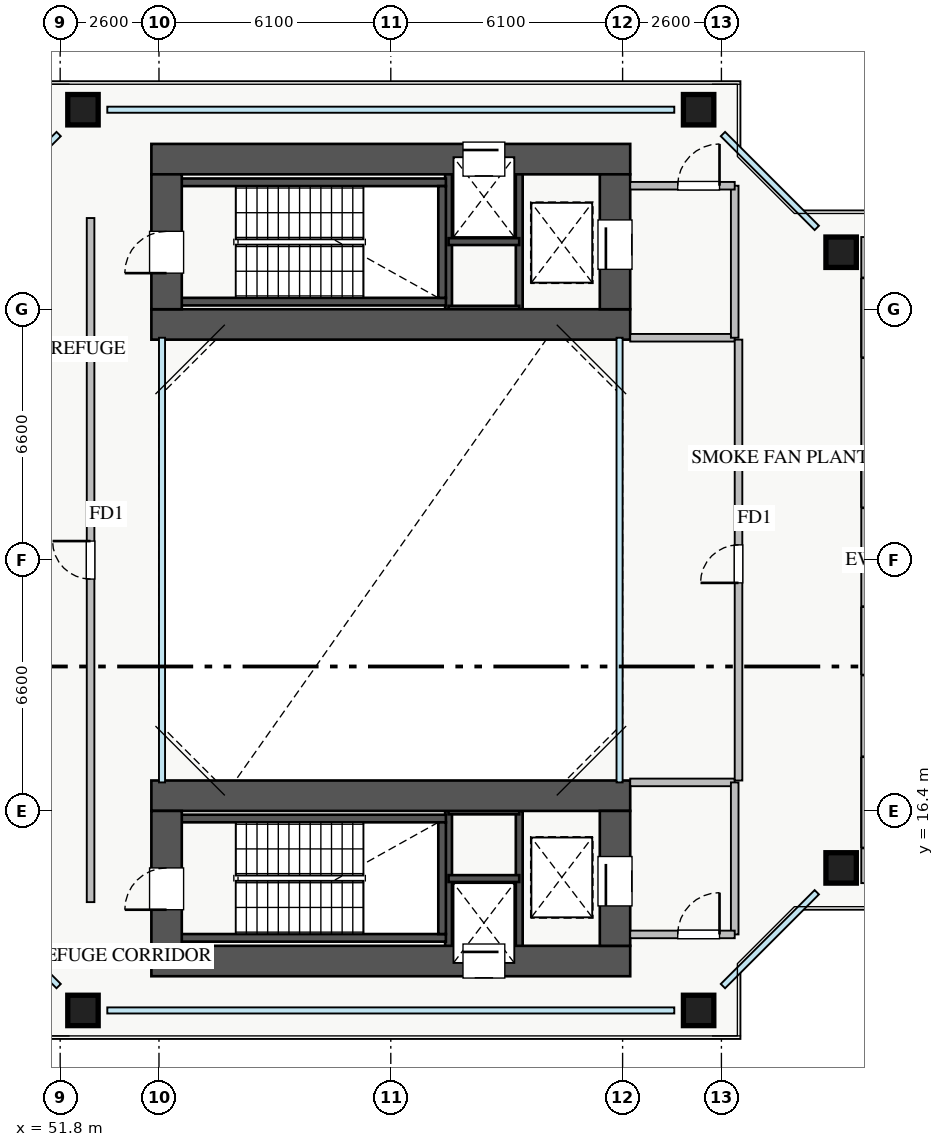
"""IFC4 building model, lengths in metres.
Left out: names, types, materials, properties, quantities, classifications, styles, units other than length and angle.
Written with IfcOpenShell. Run it as: python <this file> out.ifc"""

import sys

from ifc_helpers import new_model, si_unit, direction, frame, frame_2d, origin, origin_2d, place, context, subcontext, project, spatial, rectangle, extrude, source, transform, mapped, element, fill, save


model = new_model("IFC4")
c1 = context("Model", 3, precision=1e-05, world=origin(), true_north=direction((0.0, 1.0)))
c2 = subcontext(c1, "Body", "Model", "MODEL_VIEW")
j1 = project(units=[si_unit("LENGTHUNIT", "METRE"), si_unit("PLANEANGLEUNIT", "RADIAN")], contexts=[c1])
p1 = place(None, origin())
s1 = spatial("IfcSite", under=j1, at=p1, CompositionType="ELEMENT")
p2 = place(p1, origin())
s2 = spatial("IfcBuilding", under=s1, at=p2, CompositionType="ELEMENT")
p3 = place(p2, frame((0.0, 0.0, 92.5)))
s3 = spatial("IfcBuildingStorey", under=s2, at=p3, CompositionType="ELEMENT", Elevation=92.5)
for number, where, z_axis, x_axis in (
    (1, (62.02, 29.6, 0.0), (0.0, 0.0, 1.0), (0.0, 1.0, 0.0)),
    (2, (63.88, 29.6, 0.0), (0.0, 0.0, 1.0), (0.0, 1.0, 0.0)),
):
    element("IfcWall", number, at=place(p3, frame(where, z_axis=z_axis, x_axis=x_axis)), inside=s3, PredefinedType="SHEAR", context=c2, shape_type="SweptSolid", body=[
        extrude(rectangle(XDim=3.95, YDim=0.18, at=frame_2d((1.975, 0.0))), origin(), (0.0, 0.0, 1.0), 4.32),
    ])
for number, where, z_axis, x_axis in (
    (3, (62.02, 31.38, 0.0), (0.0, 0.0, 1.0), (1.0, 0.0, 0.0)),
    (4, (62.02, 29.6, 0.0), (0.0, 0.0, 1.0), (1.0, 0.0, 0.0)),
):
    element("IfcWall", number, at=place(p3, frame(where, z_axis=z_axis, x_axis=x_axis)), inside=s3, PredefinedType="SHEAR", context=c2, shape_type="SweptSolid", body=[
        extrude(rectangle(XDim=1.86, YDim=0.18, at=frame_2d((0.93, 0.0))), origin(), (0.0, 0.0, 1.0), 4.32),
    ])
for number, where, z_axis, x_axis in (
    (5, (62.02, 12.45, 0.0), (0.0, 0.0, 1.0), (0.0, 1.0, 0.0)),
    (6, (63.88, 12.45, 0.0), (0.0, 0.0, 1.0), (0.0, 1.0, 0.0)),
):
    element("IfcWall", number, at=place(p3, frame(where, z_axis=z_axis, x_axis=x_axis)), inside=s3, PredefinedType="SHEAR", context=c2, shape_type="SweptSolid", body=[
        extrude(rectangle(XDim=3.95, YDim=0.18, at=frame_2d((1.975, 0.0))), origin(), (0.0, 0.0, 1.0), 4.32),
    ])
for number, where, z_axis, x_axis in (
    (7, (62.02, 14.62, 0.0), (0.0, 0.0, 1.0), (1.0, 0.0, 0.0)),
    (8, (62.02, 16.4, 0.0), (0.0, 0.0, 1.0), (1.0, 0.0, 0.0)),
):
    element("IfcWall", number, at=place(p3, frame(where, z_axis=z_axis, x_axis=x_axis)), inside=s3, PredefinedType="SHEAR", context=c2, shape_type="SweptSolid", body=[
        extrude(rectangle(XDim=1.86, YDim=0.18, at=frame_2d((0.93, 0.0))), origin(), (0.0, 0.0, 1.0), 4.32),
    ])
for number, where, z_axis, x_axis in (
    (9, (54.8, 29.8, 0.0), (0.0, 0.0, 1.0), (1.0, 0.0, 0.0)),
    (10, (54.8, 32.94, 0.0), (0.0, 0.0, 1.0), (1.0, 0.0, 0.0)),
):
    element("IfcWall", number, at=place(p3, frame(where, z_axis=z_axis, x_axis=x_axis)), inside=s3, PredefinedType="SHEAR", context=c2, shape_type="SweptSolid", body=[
        extrude(rectangle(XDim=7.15, YDim=0.2, at=frame_2d((3.575, 0.0))), origin(), (0.0, 0.0, 1.0), 4.5),
    ])
p4 = place(p3, frame((61.85, 29.9, 0.0), z_axis=(0.0, 0.0, 1.0), x_axis=(0.0, 1.0, 0.0)))
e11 = element("IfcWall", 11, at=p4, inside=s3, PredefinedType="SHEAR", context=c2, shape_type="SweptSolid", body=[
    extrude(rectangle(XDim=2.94, YDim=0.2, at=frame_2d((1.47, 0.0))), origin(), (0.0, 0.0, 1.0), 4.5),
])
for number, where, z_axis, x_axis in (
    (12, (54.8, 13.06, 0.0), (0.0, 0.0, 1.0), (1.0, 0.0, 0.0)),
    (13, (54.8, 16.2, 0.0), (0.0, 0.0, 1.0), (1.0, 0.0, 0.0)),
):
    element("IfcWall", number, at=place(p3, frame(where, z_axis=z_axis, x_axis=x_axis)), inside=s3, PredefinedType="SHEAR", context=c2, shape_type="SweptSolid", body=[
        extrude(rectangle(XDim=7.15, YDim=0.2, at=frame_2d((3.575, 0.0))), origin(), (0.0, 0.0, 1.0), 4.5),
    ])
p5 = place(p3, frame((61.85, 13.16, 0.0), z_axis=(0.0, 0.0, 1.0), x_axis=(0.0, 1.0, 0.0)))
e14 = element("IfcWall", 14, at=p5, inside=s3, PredefinedType="SHEAR", context=c2, shape_type="SweptSolid", body=[
    extrude(rectangle(XDim=2.94, YDim=0.2, at=frame_2d((1.47, 0.0))), origin(), (0.0, 0.0, 1.0), 4.5),
])
p6 = place(p3, frame((54.2, 29.2, 0.0), z_axis=(0.0, 0.0, 1.0), x_axis=(1.0, 0.0, 0.0)))
e15 = element("IfcWall", 15, at=p6, inside=s3, PredefinedType="SHEAR", context=c2, shape_type="SweptSolid", body=[
    extrude(rectangle(XDim=12.6, YDim=0.8, at=frame_2d((6.3, 0.0))), origin(), (0.0, 0.0, 1.0), 4.5),
])
p7 = place(p3, frame((54.2, 33.55, 0.0), z_axis=(0.0, 0.0, 1.0), x_axis=(1.0, 0.0, 0.0)))
e16 = element("IfcWall", 16, at=p7, inside=s3, PredefinedType="SHEAR", context=c2, shape_type="SweptSolid", body=[
    extrude(rectangle(XDim=12.6, YDim=0.8, at=frame_2d((6.3, 0.0))), origin(), (0.0, 0.0, 1.0), 4.5),
])
p8 = place(p7, frame((8.2, 0.0, 0.0)))
e17 = element("IfcOpeningElement", 17, at=p8, cuts=e16, PredefinedType="OPENING", context=c2, shape_type="SweptSolid", body=[
    extrude(rectangle(XDim=1.1, YDim=2.05, at=frame_2d((0.55, 1.025))), frame((0.0, 0.41, 0.0), z_axis=(0.0, -1.0, 0.0), x_axis=(1.0, 0.0, 0.0)), (0.0, 0.0, 1.0), 0.82),
])
p9 = place(p3, frame((54.6, 29.6, 0.0), z_axis=(0.0, 0.0, 1.0), x_axis=(0.0, 1.0, 0.0)))
e18 = element("IfcWall", 18, at=p9, inside=s3, PredefinedType="SHEAR", context=c2, shape_type="SweptSolid", body=[
    extrude(rectangle(XDim=3.55, YDim=0.8, at=frame_2d((1.775, 0.0))), origin(), (0.0, 0.0, 1.0), 4.5),
])
p10 = place(p9, frame((0.95, 0.0, 0.0)))
e19 = element("IfcOpeningElement", 19, at=p10, cuts=e18, PredefinedType="OPENING", context=c2, shape_type="SweptSolid", body=[
    extrude(rectangle(XDim=1.1, YDim=2.05, at=frame_2d((0.55, 1.025))), frame((0.0, 0.41, 0.0), z_axis=(0.0, -1.0, 0.0), x_axis=(1.0, 0.0, 0.0)), (0.0, 0.0, 1.0), 0.82),
])
p11 = place(p3, frame((66.4, 29.6, 0.0), z_axis=(0.0, 0.0, 1.0), x_axis=(0.0, 1.0, 0.0)))
e20 = element("IfcWall", 20, at=p11, inside=s3, PredefinedType="SHEAR", context=c2, shape_type="SweptSolid", body=[
    extrude(rectangle(XDim=3.55, YDim=0.8, at=frame_2d((1.775, 0.0))), origin(), (0.0, 0.0, 1.0), 4.5),
])
p12 = place(p11, frame((1.05, 0.0, 0.0)))
e21 = element("IfcOpeningElement", 21, at=p12, cuts=e20, PredefinedType="OPENING", context=c2, shape_type="SweptSolid", body=[
    extrude(rectangle(XDim=1.3, YDim=2.05, at=frame_2d((0.65, 1.025))), frame((0.0, 0.41, 0.0), z_axis=(0.0, -1.0, 0.0), x_axis=(1.0, 0.0, 0.0)), (0.0, 0.0, 1.0), 0.82),
])
p13 = place(p3, frame((54.2, 12.45, 0.0), z_axis=(0.0, 0.0, 1.0), x_axis=(1.0, 0.0, 0.0)))
e22 = element("IfcWall", 22, at=p13, inside=s3, PredefinedType="SHEAR", context=c2, shape_type="SweptSolid", body=[
    extrude(rectangle(XDim=12.6, YDim=0.8, at=frame_2d((6.3, 0.0))), origin(), (0.0, 0.0, 1.0), 4.5),
])
p14 = place(p13, frame((8.2, 0.0, 0.0)))
e23 = element("IfcOpeningElement", 23, at=p14, cuts=e22, PredefinedType="OPENING", context=c2, shape_type="SweptSolid", body=[
    extrude(rectangle(XDim=1.1, YDim=2.05, at=frame_2d((0.55, 1.025))), frame((0.0, 0.41, 0.0), z_axis=(0.0, -1.0, 0.0), x_axis=(1.0, 0.0, 0.0)), (0.0, 0.0, 1.0), 0.82),
])
p15 = place(p3, frame((54.2, 16.8, 0.0), z_axis=(0.0, 0.0, 1.0), x_axis=(1.0, 0.0, 0.0)))
e24 = element("IfcWall", 24, at=p15, inside=s3, PredefinedType="SHEAR", context=c2, shape_type="SweptSolid", body=[
    extrude(rectangle(XDim=12.6, YDim=0.8, at=frame_2d((6.3, 0.0))), origin(), (0.0, 0.0, 1.0), 4.5),
])
p16 = place(p3, frame((54.6, 12.85, 0.0), z_axis=(0.0, 0.0, 1.0), x_axis=(0.0, 1.0, 0.0)))
e25 = element("IfcWall", 25, at=p16, inside=s3, PredefinedType="SHEAR", context=c2, shape_type="SweptSolid", body=[
    extrude(rectangle(XDim=3.55, YDim=0.8, at=frame_2d((1.775, 0.0))), origin(), (0.0, 0.0, 1.0), 4.5),
])
p17 = place(p16, frame((0.95, 0.0, 0.0)))
e26 = element("IfcOpeningElement", 26, at=p17, cuts=e25, PredefinedType="OPENING", context=c2, shape_type="SweptSolid", body=[
    extrude(rectangle(XDim=1.1, YDim=2.05, at=frame_2d((0.55, 1.025))), frame((0.0, 0.41, 0.0), z_axis=(0.0, -1.0, 0.0), x_axis=(1.0, 0.0, 0.0)), (0.0, 0.0, 1.0), 0.82),
])
p18 = place(p3, frame((66.4, 12.85, 0.0), z_axis=(0.0, 0.0, 1.0), x_axis=(0.0, 1.0, 0.0)))
e27 = element("IfcWall", 27, at=p18, inside=s3, PredefinedType="SHEAR", context=c2, shape_type="SweptSolid", body=[
    extrude(rectangle(XDim=3.55, YDim=0.8, at=frame_2d((1.775, 0.0))), origin(), (0.0, 0.0, 1.0), 4.5),
])
p19 = place(p18, frame((1.05, 0.0, 0.0)))
e28 = element("IfcOpeningElement", 28, at=p19, cuts=e27, PredefinedType="OPENING", context=c2, shape_type="SweptSolid", body=[
    extrude(rectangle(XDim=1.3, YDim=2.05, at=frame_2d((0.65, 1.025))), frame((0.0, 0.41, 0.0), z_axis=(0.0, -1.0, 0.0), x_axis=(1.0, 0.0, 0.0)), (0.0, 0.0, 1.0), 0.82),
])
m1 = source(origin(), c2, "Body", "SweptSolid", [
    extrude(rectangle(XDim=0.8, YDim=0.8, at=origin_2d()), origin(), (0.0, 0.0, 1.0), 4.5),
])
for number, where, z_axis, x_axis in (
    (29, (52.4, 11.15, 0.0), (0.0, 0.0, 1.0), (1.0, 0.0, 0.0)),
    (30, (68.6, 11.15, 0.0), (0.0, 0.0, 1.0), (1.0, 0.0, 0.0)),
    (31, (72.35, 14.9, 0.0), (0.0, 0.0, 1.0), (1.0, 0.0, 0.0)),
    (32, (72.35, 31.1, 0.0), (0.0, 0.0, 1.0), (1.0, 0.0, 0.0)),
    (33, (68.6, 34.85, 0.0), (0.0, 0.0, 1.0), (1.0, 0.0, 0.0)),
    (34, (52.4, 34.85, 0.0), (0.0, 0.0, 1.0), (1.0, 0.0, 0.0)),
):
    element("IfcColumn", number, at=place(p3, frame(where, z_axis=z_axis, x_axis=x_axis)), inside=s3, PredefinedType="COLUMN", context=c2, shape_type="MappedRepresentation", body=[
        mapped(m1, transform((0.0, 0.0, 0.0), x_axis=(1.0, 0.0, 0.0), y_axis=(0.0, 1.0, 0.0), z_axis=(0.0, 0.0, 1.0), scale=1.0)),
    ])
p20 = place(p3, frame((72.99, 14.5, 0.0), z_axis=(0.0, 0.0, 1.0), x_axis=(0.0, 1.0, 0.0)))
e35 = element("IfcWall", 35, at=p20, inside=s3, PredefinedType="STANDARD", context=c2, shape_type="SweptSolid", body=[
    extrude(rectangle(XDim=17.0, YDim=0.22, at=frame_2d((8.5, 0.0))), origin(), (0.0, 0.0, 1.0), 3.86),
])
p21 = place(p20, frame((0.925, 0.0, 0.9)))
e36 = element("IfcOpeningElement", 36, at=p21, cuts=e35, PredefinedType="OPENING", context=c2, shape_type="SweptSolid", body=[
    extrude(rectangle(XDim=2.4, YDim=1.48, at=frame_2d((1.2, 0.74))), frame((0.0, 0.12, 0.0), z_axis=(0.0, -1.0, 0.0), x_axis=(1.0, 0.0, 0.0)), (0.0, 0.0, 1.0), 0.24),
])
p22 = place(p20, frame((5.475, 0.0, 0.9)))
e37 = element("IfcOpeningElement", 37, at=p22, cuts=e35, PredefinedType="OPENING", context=c2, shape_type="SweptSolid", body=[
    extrude(rectangle(XDim=1.8, YDim=1.45, at=frame_2d((0.9, 0.725))), frame((0.0, 0.12, 0.0), z_axis=(0.0, -1.0, 0.0), x_axis=(1.0, 0.0, 0.0)), (0.0, 0.0, 1.0), 0.24),
])
p23 = place(p20, frame((9.875, 0.0, 0.9)))
e38 = element("IfcOpeningElement", 38, at=p23, cuts=e35, PredefinedType="OPENING", context=c2, shape_type="SweptSolid", body=[
    extrude(rectangle(XDim=1.5, YDim=1.45, at=frame_2d((0.75, 0.725))), frame((0.0, 0.12, 0.0), z_axis=(0.0, -1.0, 0.0), x_axis=(1.0, 0.0, 0.0)), (0.0, 0.0, 1.0), 0.24),
])
p24 = place(p20, frame((13.825, 0.0, 0.9)))
e39 = element("IfcOpeningElement", 39, at=p24, cuts=e35, PredefinedType="OPENING", context=c2, shape_type="SweptSolid", body=[
    extrude(rectangle(XDim=2.1, YDim=1.48, at=frame_2d((1.05, 0.74))), frame((0.0, 0.12, 0.0), z_axis=(0.0, -1.0, 0.0), x_axis=(1.0, 0.0, 0.0)), (0.0, 0.0, 1.0), 0.24),
])
p25 = place(p3, frame((66.8, 28.85, 0.0), z_axis=(0.0, 0.0, 1.0), x_axis=(1.0, 0.0, 0.0)))
e40 = element("IfcWall", 40, at=p25, inside=s3, PredefinedType="PARTITIONING", context=c2, shape_type="SweptSolid", body=[
    extrude(rectangle(XDim=2.75, YDim=0.2, at=frame_2d((1.375, 0.0))), origin(), (0.0, 0.0, 1.0), 4.32),
])
p26 = place(p3, frame((69.55, 28.85, 0.0), z_axis=(0.0, 0.0, 1.0), x_axis=(0.0, 1.0, 0.0)))
e41 = element("IfcWall", 41, at=p26, inside=s3, PredefinedType="PARTITIONING", context=c2, shape_type="SweptSolid", body=[
    extrude(rectangle(XDim=4.0, YDim=0.2, at=frame_2d((2.0, 0.0))), origin(), (0.0, 0.0, 1.0), 4.32),
])
p27 = place(p3, frame((66.8, 32.85, 0.0), z_axis=(0.0, 0.0, 1.0), x_axis=(1.0, 0.0, 0.0)))
e42 = element("IfcWall", 42, at=p27, inside=s3, PredefinedType="PARTITIONING", context=c2, shape_type="SweptSolid", body=[
    extrude(rectangle(XDim=2.75, YDim=0.2, at=frame_2d((1.375, 0.0))), origin(), (0.0, 0.0, 1.0), 4.32),
])
p28 = place(p27, frame((1.25, 0.0, 0.0)))
e43 = element("IfcOpeningElement", 43, at=p28, cuts=e42, PredefinedType="OPENING", context=c2, shape_type="SweptSolid", body=[
    extrude(rectangle(XDim=1.1, YDim=2.05, at=frame_2d((0.55, 1.025))), frame((0.0, 0.11, 0.0), z_axis=(0.0, -1.0, 0.0), x_axis=(1.0, 0.0, 0.0)), (0.0, 0.0, 1.0), 0.22),
])
p29 = place(p3, frame((66.8, 17.15, 0.0), z_axis=(0.0, 0.0, 1.0), x_axis=(1.0, 0.0, 0.0)))
e44 = element("IfcWall", 44, at=p29, inside=s3, PredefinedType="PARTITIONING", context=c2, shape_type="SweptSolid", body=[
    extrude(rectangle(XDim=2.75, YDim=0.2, at=frame_2d((1.375, 0.0))), origin(), (0.0, 0.0, 1.0), 4.32),
])
p30 = place(p3, frame((69.55, 13.15, 0.0), z_axis=(0.0, 0.0, 1.0), x_axis=(0.0, 1.0, 0.0)))
e45 = element("IfcWall", 45, at=p30, inside=s3, PredefinedType="PARTITIONING", context=c2, shape_type="SweptSolid", body=[
    extrude(rectangle(XDim=4.0, YDim=0.2, at=frame_2d((2.0, 0.0))), origin(), (0.0, 0.0, 1.0), 4.32),
])
p31 = place(p3, frame((66.8, 13.15, 0.0), z_axis=(0.0, 0.0, 1.0), x_axis=(1.0, 0.0, 0.0)))
e46 = element("IfcWall", 46, at=p31, inside=s3, PredefinedType="PARTITIONING", context=c2, shape_type="SweptSolid", body=[
    extrude(rectangle(XDim=2.75, YDim=0.2, at=frame_2d((1.375, 0.0))), origin(), (0.0, 0.0, 1.0), 4.32),
])
p32 = place(p31, frame((1.25, 0.0, 0.0)))
e47 = element("IfcOpeningElement", 47, at=p32, cuts=e46, PredefinedType="OPENING", context=c2, shape_type="SweptSolid", body=[
    extrude(rectangle(XDim=1.1, YDim=2.05, at=frame_2d((0.55, 1.025))), frame((0.0, 0.11, 0.0), z_axis=(0.0, -1.0, 0.0), x_axis=(1.0, 0.0, 0.0)), (0.0, 0.0, 1.0), 0.22),
])
p33 = place(p3, frame((52.6, 14.0, 0.0), z_axis=(0.0, 0.0, 1.0), x_axis=(0.0, 1.0, 0.0)))
e48 = element("IfcWall", 48, at=p33, inside=s3, PredefinedType="PARTITIONING", context=c2, shape_type="SweptSolid", body=[
    extrude(rectangle(XDim=18.0, YDim=0.2, at=frame_2d((9.0, 0.0))), origin(), (0.0, 0.0, 1.0), 3.865),
])
p34 = place(p33, frame((8.5, 0.0, 0.0)))
e49 = element("IfcOpeningElement", 49, at=p34, cuts=e48, PredefinedType="OPENING", context=c2, shape_type="SweptSolid", body=[
    extrude(rectangle(XDim=1.0, YDim=2.05, at=frame_2d((0.5, 1.025))), frame((0.0, 0.11, 0.0), z_axis=(0.0, -1.0, 0.0), x_axis=(1.0, 0.0, 0.0)), (0.0, 0.0, 1.0), 0.22),
])
p35 = place(p3, frame((69.65, 17.2, 0.0), z_axis=(0.0, 0.0, 1.0), x_axis=(0.0, 1.0, 0.0)))
e50 = element("IfcWall", 50, at=p35, inside=s3, PredefinedType="PARTITIONING", context=c2, shape_type="SweptSolid", body=[
    extrude(rectangle(XDim=11.6, YDim=0.2, at=frame_2d((5.8, 0.0))), origin(), (0.0, 0.0, 1.0), 4.32),
])
p36 = place(p35, frame((5.2, 0.0, 0.0)))
e51 = element("IfcOpeningElement", 51, at=p36, cuts=e50, PredefinedType="OPENING", context=c2, shape_type="SweptSolid", body=[
    extrude(rectangle(XDim=1.0, YDim=2.05, at=frame_2d((0.5, 1.025))), frame((0.0, 0.11, 0.0), z_axis=(0.0, -1.0, 0.0), x_axis=(1.0, 0.0, 0.0)), (0.0, 0.0, 1.0), 0.22),
])
m2 = source(origin(), c2, "Body", "SweptSolid", [
    extrude(rectangle(XDim=2.4, YDim=1.48, at=frame_2d((1.2, 0.74))), frame((0.0, 0.03, 0.0), z_axis=(0.0, -1.0, 0.0), x_axis=(1.0, 0.0, 0.0)), (0.0, 0.0, 1.0), 0.06),
])
p37 = place(p21, origin())
e52 = element("IfcWindow", 52, at=p37, inside=s3, PartitioningType="TRIPLE_PANEL_VERTICAL", PredefinedType="WINDOW", context=c2, shape_type="MappedRepresentation", body=[
    mapped(m2, transform((0.0, 0.0, 0.0), x_axis=(1.0, 0.0, 0.0), y_axis=(0.0, 1.0, 0.0), z_axis=(0.0, 0.0, 1.0), scale=1.0)),
])
fill(e36, e52)
m3 = source(origin(), c2, "Body", "SweptSolid", [
    extrude(rectangle(XDim=1.8, YDim=1.45, at=frame_2d((0.9, 0.725))), frame((0.0, 0.03, 0.0), z_axis=(0.0, -1.0, 0.0), x_axis=(1.0, 0.0, 0.0)), (0.0, 0.0, 1.0), 0.06),
])
p38 = place(p22, origin())
e53 = element("IfcWindow", 53, at=p38, inside=s3, PartitioningType="DOUBLE_PANEL_VERTICAL", PredefinedType="WINDOW", context=c2, shape_type="MappedRepresentation", body=[
    mapped(m3, transform((0.0, 0.0, 0.0), x_axis=(1.0, 0.0, 0.0), y_axis=(0.0, 1.0, 0.0), z_axis=(0.0, 0.0, 1.0), scale=1.0)),
])
fill(e37, e53)
m4 = source(origin(), c2, "Body", "SweptSolid", [
    extrude(rectangle(XDim=1.5, YDim=1.45, at=frame_2d((0.75, 0.725))), frame((0.0, 0.03, 0.0), z_axis=(0.0, -1.0, 0.0), x_axis=(1.0, 0.0, 0.0)), (0.0, 0.0, 1.0), 0.06),
])
p39 = place(p23, origin())
e54 = element("IfcWindow", 54, at=p39, inside=s3, PartitioningType="DOUBLE_PANEL_VERTICAL", PredefinedType="WINDOW", context=c2, shape_type="MappedRepresentation", body=[
    mapped(m4, transform((0.0, 0.0, 0.0), x_axis=(1.0, 0.0, 0.0), y_axis=(0.0, 1.0, 0.0), z_axis=(0.0, 0.0, 1.0), scale=1.0)),
])
fill(e38, e54)
m5 = source(origin(), c2, "Body", "SweptSolid", [
    extrude(rectangle(XDim=2.1, YDim=1.48, at=frame_2d((1.05, 0.74))), frame((0.0, 0.03, 0.0), z_axis=(0.0, -1.0, 0.0), x_axis=(1.0, 0.0, 0.0)), (0.0, 0.0, 1.0), 0.06),
])
p40 = place(p24, origin())
e55 = element("IfcWindow", 55, at=p40, inside=s3, PartitioningType="TRIPLE_PANEL_VERTICAL", PredefinedType="WINDOW", context=c2, shape_type="MappedRepresentation", body=[
    mapped(m5, transform((0.0, 0.0, 0.0), x_axis=(1.0, 0.0, 0.0), y_axis=(0.0, 1.0, 0.0), z_axis=(0.0, 0.0, 1.0), scale=1.0)),
])
fill(e39, e55)
m6 = source(origin(), c2, "Body", "SweptSolid", [
    extrude(rectangle(XDim=1.3, YDim=2.05, at=frame_2d((0.65, 1.025))), frame((0.0, 0.025, 0.0), z_axis=(0.0, -1.0, 0.0), x_axis=(1.0, 0.0, 0.0)), (0.0, 0.0, 1.0), 0.05),
])
p41 = place(p12, origin())
e56 = element("IfcDoor", 56, at=p41, inside=s3, OperationType="SLIDING_TO_LEFT", PredefinedType="DOOR", context=c2, shape_type="MappedRepresentation", body=[
    mapped(m6, transform((0.0, 0.0, 0.0), x_axis=(1.0, 0.0, 0.0), y_axis=(0.0, 1.0, 0.0), z_axis=(0.0, 0.0, 1.0), scale=1.0)),
])
fill(e21, e56)
m7 = source(origin(), c2, "Body", "SweptSolid", [
    extrude(rectangle(XDim=1.1, YDim=2.05, at=frame_2d((0.55, 1.025))), frame((0.0, 0.025, 0.0), z_axis=(0.0, -1.0, 0.0), x_axis=(1.0, 0.0, 0.0)), (0.0, 0.0, 1.0), 0.05),
])
p42 = place(p10, origin())
e57 = element("IfcDoor", 57, at=p42, inside=s3, OperationType="SINGLE_SWING_LEFT", PredefinedType="DOOR", context=c2, shape_type="MappedRepresentation", body=[
    mapped(m7, transform((0.0, 0.0, 0.0), x_axis=(1.0, 0.0, 0.0), y_axis=(0.0, 1.0, 0.0), z_axis=(0.0, 0.0, 1.0), scale=1.0)),
])
fill(e19, e57)
p43 = place(p8, origin())
e58 = element("IfcDoor", 58, at=p43, inside=s3, OperationType="SLIDING_TO_LEFT", PredefinedType="DOOR", context=c2, shape_type="MappedRepresentation", body=[
    mapped(m7, transform((0.0, 0.0, 0.0), x_axis=(1.0, 0.0, 0.0), y_axis=(0.0, 1.0, 0.0), z_axis=(0.0, 0.0, 1.0), scale=1.0)),
])
fill(e17, e58)
p44 = place(p19, origin())
e59 = element("IfcDoor", 59, at=p44, inside=s3, OperationType="SLIDING_TO_RIGHT", PredefinedType="DOOR", context=c2, shape_type="MappedRepresentation", body=[
    mapped(m6, transform((0.0, 0.0, 0.0), x_axis=(1.0, 0.0, 0.0), y_axis=(0.0, 1.0, 0.0), z_axis=(0.0, 0.0, 1.0), scale=1.0)),
])
fill(e28, e59)
p45 = place(p17, origin())
e60 = element("IfcDoor", 60, at=p45, inside=s3, OperationType="SINGLE_SWING_LEFT", PredefinedType="DOOR", context=c2, shape_type="MappedRepresentation", body=[
    mapped(m7, transform((0.0, 0.0, 0.0), x_axis=(1.0, 0.0, 0.0), y_axis=(0.0, 1.0, 0.0), z_axis=(0.0, 0.0, 1.0), scale=1.0)),
])
fill(e26, e60)
p46 = place(p14, origin())
e61 = element("IfcDoor", 61, at=p46, inside=s3, OperationType="SLIDING_TO_RIGHT", PredefinedType="DOOR", context=c2, shape_type="MappedRepresentation", body=[
    mapped(m7, transform((0.0, 0.0, 0.0), x_axis=(1.0, 0.0, 0.0), y_axis=(0.0, 1.0, 0.0), z_axis=(0.0, 0.0, 1.0), scale=1.0)),
])
fill(e23, e61)
p47 = place(p28, origin())
e62 = element("IfcDoor", 62, at=p47, inside=s3, OperationType="SINGLE_SWING_RIGHT", PredefinedType="DOOR", context=c2, shape_type="MappedRepresentation", body=[
    mapped(m7, transform((0.0, 0.0, 0.0), x_axis=(1.0, 0.0, 0.0), y_axis=(0.0, 1.0, 0.0), z_axis=(0.0, 0.0, 1.0), scale=1.0)),
])
fill(e43, e62)
p48 = place(p32, origin())
e63 = element("IfcDoor", 63, at=p48, inside=s3, OperationType="SINGLE_SWING_RIGHT", PredefinedType="DOOR", context=c2, shape_type="MappedRepresentation", body=[
    mapped(m7, transform((0.0, 0.0, 0.0), x_axis=(1.0, 0.0, 0.0), y_axis=(0.0, 1.0, 0.0), z_axis=(0.0, 0.0, 1.0), scale=1.0)),
])
fill(e47, e63)
m8 = source(origin(), c2, "Body", "SweptSolid", [
    extrude(rectangle(XDim=1.0, YDim=2.05, at=frame_2d((0.5, 1.025))), frame((0.0, 0.025, 0.0), z_axis=(0.0, -1.0, 0.0), x_axis=(1.0, 0.0, 0.0)), (0.0, 0.0, 1.0), 0.05),
])
p49 = place(p34, origin())
e64 = element("IfcDoor", 64, at=p49, inside=s3, OperationType="SINGLE_SWING_RIGHT", PredefinedType="DOOR", context=c2, shape_type="MappedRepresentation", body=[
    mapped(m8, transform((0.0, 0.0, 0.0), x_axis=(1.0, 0.0, 0.0), y_axis=(0.0, 1.0, 0.0), z_axis=(0.0, 0.0, 1.0), scale=1.0)),
])
fill(e49, e64)
p50 = place(p36, origin())
e65 = element("IfcDoor", 65, at=p50, inside=s3, OperationType="SINGLE_SWING_LEFT", PredefinedType="DOOR", context=c2, shape_type="MappedRepresentation", body=[
    mapped(m8, transform((0.0, 0.0, 0.0), x_axis=(1.0, 0.0, 0.0), y_axis=(0.0, 1.0, 0.0), z_axis=(0.0, 0.0, 1.0), scale=1.0)),
])
fill(e51, e65)
save(model, sys.argv[1])
